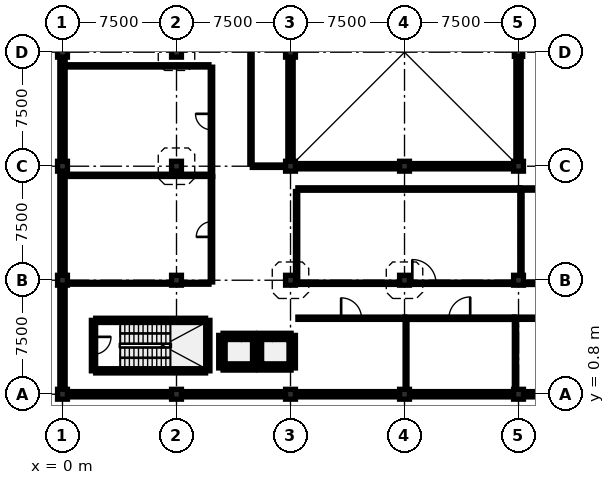
"""IFC4 building model, lengths in metres.
Left out: names, types, materials, properties, quantities, classifications, styles, units other than length and angle.
Written with IfcOpenShell. Run it as: python <this file> out.ifc"""

import sys

from ifc_helpers import new_model, si_unit, direction, frame, frame_2d, origin, origin_2d, place, context, subcontext, project, spatial, rectangle, extrude, element, fill, save


model = new_model("IFC4")
c1 = context("Model", 3, precision=1e-05, world=origin(), true_north=direction((0.0, 1.0)))
c2 = subcontext(c1, "Body", "Model", "MODEL_VIEW")
j1 = project(units=[si_unit("LENGTHUNIT", "METRE"), si_unit("PLANEANGLEUNIT", "RADIAN")], contexts=[c1])
p1 = place(None, origin())
s1 = spatial("IfcSite", under=j1, at=p1, CompositionType="ELEMENT")
p2 = place(p1, origin())
s2 = spatial("IfcBuilding", under=s1, at=p2, CompositionType="ELEMENT")
p3 = place(p2, frame((0.0, 0.0, 9.5)))
s3 = spatial("IfcBuildingStorey", under=s2, at=p3, CompositionType="ELEMENT", Elevation=9.5)
for number, where, z_axis, x_axis in (
    (1, (0.0, 0.8, 0.0), (0.0, 0.0, 1.0), (1.0, 0.0, 0.0)),
    (2, (0.0, 8.3, 0.0), (0.0, 0.0, 1.0), (1.0, 0.0, 0.0)),
    (3, (0.0, 15.8, 0.0), (0.0, 0.0, 1.0), (1.0, 0.0, 0.0)),
    (4, (0.0, 23.3, 0.0), (0.0, 0.0, 1.0), (1.0, 0.0, 0.0)),
    (5, (7.5, 0.8, 0.0), (0.0, 0.0, 1.0), (1.0, 0.0, 0.0)),
    (6, (7.5, 8.3, 0.0), (0.0, 0.0, 1.0), (1.0, 0.0, 0.0)),
    (7, (7.5, 15.8, 0.0), (0.0, 0.0, 1.0), (1.0, 0.0, 0.0)),
    (8, (7.5, 23.3, 0.0), (0.0, 0.0, 1.0), (1.0, 0.0, 0.0)),
    (9, (15.0, 0.8, 0.0), (0.0, 0.0, 1.0), (1.0, 0.0, 0.0)),
    (10, (15.0, 8.3, 0.0), (0.0, 0.0, 1.0), (1.0, 0.0, 0.0)),
    (11, (15.0, 15.8, 0.0), (0.0, 0.0, 1.0), (1.0, 0.0, 0.0)),
    (12, (15.0, 23.3, 0.0), (0.0, 0.0, 1.0), (1.0, 0.0, 0.0)),
    (13, (22.5, 0.8, 0.0), (0.0, 0.0, 1.0), (1.0, 0.0, 0.0)),
    (14, (22.5, 8.3, 0.0), (0.0, 0.0, 1.0), (1.0, 0.0, 0.0)),
    (15, (22.5, 15.8, 0.0), (0.0, 0.0, 1.0), (1.0, 0.0, 0.0)),
    (16, (30.0, 0.8, 0.0), (0.0, 0.0, 1.0), (1.0, 0.0, 0.0)),
    (17, (30.0, 8.3, 0.0), (0.0, 0.0, 1.0), (1.0, 0.0, 0.0)),
    (18, (30.0, 15.8, 0.0), (0.0, 0.0, 1.0), (1.0, 0.0, 0.0)),
):
    element("IfcColumn", number, at=place(p3, frame(where, z_axis=z_axis, x_axis=x_axis)), inside=s3, PredefinedType="COLUMN", context=c2, shape_type="SweptSolid", body=[
        extrude(rectangle(XDim=0.65, YDim=0.65, at=origin_2d()), origin(), (0.0, 0.0, 1.0), 3.7),
    ])
p4 = place(p3, frame((30.0, 23.3, 0.0), z_axis=(0.0, 0.0, 1.0), x_axis=(1.0, 0.0, 0.0)))
e19 = element("IfcColumn", 19, at=p4, inside=s3, PredefinedType="COLUMN", context=c2, shape_type="SweptSolid", body=[
    extrude(rectangle(XDim=0.55, YDim=0.55, at=origin_2d()), origin(), (0.0, 0.0, 1.0), 3.7),
])
p5 = place(p3, frame((37.2, 0.8, 0.0), z_axis=(0.0, 0.0, 1.0), x_axis=(-1.0, 0.0, 0.0)))
e20 = element("IfcWall", 20, at=p5, inside=s3, PredefinedType="SOLIDWALL", context=c2, shape_type="SweptSolid", body=[
    extrude(rectangle(XDim=6.875, YDim=0.35, at=frame_2d((3.438, 0.0))), origin(), (0.0, 0.0, 1.0), 2.985),
])
for number, where, z_axis, x_axis in (
    (21, (29.675, 0.8, 0.0), (0.0, 0.0, 1.0), (-1.0, 0.0, 0.0)),
    (22, (22.175, 0.8, 0.0), (0.0, 0.0, 1.0), (-1.0, 0.0, 0.0)),
):
    element("IfcWall", number, at=place(p3, frame(where, z_axis=z_axis, x_axis=x_axis)), inside=s3, PredefinedType="SOLIDWALL", context=c2, shape_type="SweptSolid", body=[
        extrude(rectangle(XDim=6.85, YDim=0.35, at=frame_2d((3.425, 0.0))), origin(), (0.0, 0.0, 1.0), 2.785),
    ])
for number, where, z_axis, x_axis in (
    (23, (14.675, 0.8, 0.0), (0.0, 0.0, 1.0), (-1.0, 0.0, 0.0)),
    (24, (7.175, 0.8, 0.0), (0.0, 0.0, 1.0), (-1.0, 0.0, 0.0)),
):
    element("IfcWall", number, at=place(p3, frame(where, z_axis=z_axis, x_axis=x_axis)), inside=s3, PredefinedType="SOLIDWALL", context=c2, shape_type="SweptSolid", body=[
        extrude(rectangle(XDim=6.85, YDim=0.35, at=frame_2d((3.425, 0.0))), origin(), (0.0, 0.0, 1.0), 3.035),
    ])
p6 = place(p3, frame((0.0, 1.125, 0.0), z_axis=(0.0, 0.0, 1.0), x_axis=(0.0, 1.0, 0.0)))
e25 = element("IfcWall", 25, at=p6, inside=s3, PredefinedType="SOLIDWALL", context=c2, shape_type="SweptSolid", body=[
    extrude(rectangle(XDim=6.85, YDim=0.35, at=frame_2d((3.425, 0.0))), origin(), (0.0, 0.0, 1.0), 2.985),
])
for number, where, z_axis, x_axis in (
    (26, (0.0, 8.625, 0.0), (0.0, 0.0, 1.0), (0.0, 1.0, 0.0)),
    (27, (0.0, 16.125, 0.0), (0.0, 0.0, 1.0), (0.0, 1.0, 0.0)),
    (28, (15.325, 15.8, 0.0), (0.0, 0.0, 1.0), (1.0, 0.0, 0.0)),
):
    element("IfcWall", number, at=place(p3, frame(where, z_axis=z_axis, x_axis=x_axis)), inside=s3, PredefinedType="SOLIDWALL", context=c2, shape_type="SweptSolid", body=[
        extrude(rectangle(XDim=6.85, YDim=0.35, at=frame_2d((3.425, 0.0))), origin(), (0.0, 0.0, 1.0), 2.785),
    ])
p7 = place(p3, frame((22.825, 15.8, 0.0), z_axis=(0.0, 0.0, 1.0), x_axis=(1.0, 0.0, 0.0)))
e29 = element("IfcWall", 29, at=p7, inside=s3, PredefinedType="SOLIDWALL", context=c2, shape_type="SweptSolid", body=[
    extrude(rectangle(XDim=6.85, YDim=0.35, at=frame_2d((3.425, 0.0))), origin(), (0.0, 0.0, 1.0), 2.785),
])
p8 = place(p7, frame((2.725, 0.0, 0.9)))
e30 = element("IfcOpeningElement", 30, at=p8, cuts=e29, PredefinedType="OPENING", context=c2, shape_type="SweptSolid", body=[
    extrude(rectangle(XDim=1.4, YDim=1.5, at=frame_2d((0.7, 0.75))), frame((0.0, 0.187, 0.0), z_axis=(0.0, -1.0, 0.0), x_axis=(1.0, 0.0, 0.0)), (0.0, 0.0, 1.0), 0.374),
])
p9 = place(p3, frame((30.0, 16.125, 0.0), z_axis=(0.0, 0.0, 1.0), x_axis=(0.0, 1.0, 0.0)))
e31 = element("IfcWall", 31, at=p9, inside=s3, PredefinedType="SOLIDWALL", context=c2, shape_type="SweptSolid", body=[
    extrude(rectangle(XDim=6.9, YDim=0.35, at=frame_2d((3.45, 0.0))), origin(), (0.0, 0.0, 1.0), 2.985),
])
p10 = place(p9, frame((2.75, 0.0, 0.9)))
e32 = element("IfcOpeningElement", 32, at=p10, cuts=e31, PredefinedType="OPENING", context=c2, shape_type="SweptSolid", body=[
    extrude(rectangle(XDim=1.4, YDim=1.7, at=frame_2d((0.7, 0.85))), frame((0.0, 0.187, 0.0), z_axis=(0.0, -1.0, 0.0), x_axis=(1.0, 0.0, 0.0)), (0.0, 0.0, 1.0), 0.374),
])
p11 = place(p3, frame((15.0, 22.975, 0.0), z_axis=(0.0, 0.0, 1.0), x_axis=(0.0, -1.0, 0.0)))
e33 = element("IfcWall", 33, at=p11, inside=s3, PredefinedType="SOLIDWALL", context=c2, shape_type="SweptSolid", body=[
    extrude(rectangle(XDim=6.85, YDim=0.35, at=frame_2d((3.425, 0.0))), origin(), (0.0, 0.0, 1.0), 2.785),
])
p12 = place(p3, frame((2.185, 2.34, 0.0), z_axis=(0.0, 0.0, 1.0), x_axis=(1.0, 0.0, 0.0)))
e34 = element("IfcWall", 34, at=p12, inside=s3, PredefinedType="SHEAR", context=c2, shape_type="SweptSolid", body=[
    extrude(rectangle(XDim=7.23, YDim=0.28, at=frame_2d((3.615, 0.0))), origin(), (0.0, 0.0, 1.0), 3.7),
])
p13 = place(p3, frame((9.56, 2.34, 0.0), z_axis=(0.0, 0.0, 1.0), x_axis=(0.0, 1.0, 0.0)))
e35 = element("IfcWall", 35, at=p13, inside=s3, PredefinedType="SHEAR", context=c2, shape_type="SweptSolid", body=[
    extrude(rectangle(XDim=3.32, YDim=0.28, at=frame_2d((1.66, 0.0))), origin(), (0.0, 0.0, 1.0), 3.7),
])
p14 = place(p3, frame((9.415, 5.66, 0.0), z_axis=(0.0, 0.0, 1.0), x_axis=(-1.0, 0.0, 0.0)))
e36 = element("IfcWall", 36, at=p14, inside=s3, PredefinedType="SHEAR", context=c2, shape_type="SweptSolid", body=[
    extrude(rectangle(XDim=7.23, YDim=0.28, at=frame_2d((3.615, 0.0))), origin(), (0.0, 0.0, 1.0), 3.7),
])
p15 = place(p3, frame((2.04, 5.66, 0.0), z_axis=(0.0, 0.0, 1.0), x_axis=(0.0, -1.0, 0.0)))
e37 = element("IfcWall", 37, at=p15, inside=s3, PredefinedType="SHEAR", context=c2, shape_type="SweptSolid", body=[
    extrude(rectangle(XDim=3.32, YDim=0.28, at=frame_2d((1.66, 0.0))), origin(), (0.0, 0.0, 1.0), 3.7),
])
p16 = place(p15, frame((1.085, 0.0, 0.0)))
e38 = element("IfcOpeningElement", 38, at=p16, cuts=e37, PredefinedType="OPENING", context=c2, shape_type="SweptSolid", body=[
    extrude(rectangle(XDim=1.15, YDim=2.15, at=frame_2d((0.575, 1.075))), frame((0.0, 0.152, 0.0), z_axis=(0.0, -1.0, 0.0), x_axis=(1.0, 0.0, 0.0)), (0.0, 0.0, 1.0), 0.304),
])
p17 = place(p3, frame((10.562, 2.529, 0.0), z_axis=(0.0, 0.0, 1.0), x_axis=(1.0, 0.0, 0.0)))
e39 = element("IfcWall", 39, at=p17, inside=s3, PredefinedType="SHEAR", context=c2, shape_type="SweptSolid", body=[
    extrude(rectangle(XDim=2.077, YDim=0.28, at=frame_2d((1.039, 0.0))), origin(), (0.0, 0.0, 1.0), 3.7),
])
p18 = place(p3, frame((12.783, 2.529, 0.0), z_axis=(0.0, 0.0, 1.0), x_axis=(0.0, 1.0, 0.0)))
e40 = element("IfcWall", 40, at=p18, inside=s3, PredefinedType="SHEAR", context=c2, shape_type="SweptSolid", body=[
    extrude(rectangle(XDim=2.141, YDim=0.28, at=frame_2d((1.071, 0.0))), origin(), (0.0, 0.0, 1.0), 3.7),
])
p19 = place(p3, frame((12.638, 4.671, 0.0), z_axis=(0.0, 0.0, 1.0), x_axis=(-1.0, 0.0, 0.0)))
e41 = element("IfcWall", 41, at=p19, inside=s3, PredefinedType="SHEAR", context=c2, shape_type="SweptSolid", body=[
    extrude(rectangle(XDim=2.077, YDim=0.28, at=frame_2d((1.039, 0.0))), origin(), (0.0, 0.0, 1.0), 3.7),
])
p20 = place(p19, frame((0.489, 0.0, 0.0)))
e42 = element("IfcOpeningElement", 42, at=p20, cuts=e41, PredefinedType="OPENING", context=c2, shape_type="SweptSolid", body=[
    extrude(rectangle(XDim=1.1, YDim=2.15, at=frame_2d((0.55, 1.075))), frame((0.0, 0.152, 0.0), z_axis=(0.0, -1.0, 0.0), x_axis=(1.0, 0.0, 0.0)), (0.0, 0.0, 1.0), 0.304),
])
p21 = place(p3, frame((10.417, 4.671, 0.0), z_axis=(0.0, 0.0, 1.0), x_axis=(0.0, -1.0, 0.0)))
e43 = element("IfcWall", 43, at=p21, inside=s3, PredefinedType="SHEAR", context=c2, shape_type="SweptSolid", body=[
    extrude(rectangle(XDim=2.141, YDim=0.28, at=frame_2d((1.071, 0.0))), origin(), (0.0, 0.0, 1.0), 3.7),
])
p22 = place(p3, frame((12.928, 2.529, 0.0), z_axis=(0.0, 0.0, 1.0), x_axis=(1.0, 0.0, 0.0)))
e44 = element("IfcWall", 44, at=p22, inside=s3, PredefinedType="SHEAR", context=c2, shape_type="SweptSolid", body=[
    extrude(rectangle(XDim=2.11, YDim=0.28, at=frame_2d((1.055, 0.0))), origin(), (0.0, 0.0, 1.0), 3.7),
])
p23 = place(p3, frame((15.184, 2.529, 0.0), z_axis=(0.0, 0.0, 1.0), x_axis=(0.0, 1.0, 0.0)))
e45 = element("IfcWall", 45, at=p23, inside=s3, PredefinedType="SHEAR", context=c2, shape_type="SweptSolid", body=[
    extrude(rectangle(XDim=2.141, YDim=0.28, at=frame_2d((1.071, 0.0))), origin(), (0.0, 0.0, 1.0), 3.7),
])
p24 = place(p3, frame((15.039, 4.671, 0.0), z_axis=(0.0, 0.0, 1.0), x_axis=(-1.0, 0.0, 0.0)))
e46 = element("IfcWall", 46, at=p24, inside=s3, PredefinedType="SHEAR", context=c2, shape_type="SweptSolid", body=[
    extrude(rectangle(XDim=2.11, YDim=0.28, at=frame_2d((1.055, 0.0))), origin(), (0.0, 0.0, 1.0), 3.7),
])
p25 = place(p24, frame((0.505, 0.0, 0.0)))
e47 = element("IfcOpeningElement", 47, at=p25, cuts=e46, PredefinedType="OPENING", context=c2, shape_type="SweptSolid", body=[
    extrude(rectangle(XDim=1.1, YDim=2.15, at=frame_2d((0.55, 1.075))), frame((0.0, 0.152, 0.0), z_axis=(0.0, -1.0, 0.0), x_axis=(1.0, 0.0, 0.0)), (0.0, 0.0, 1.0), 0.304),
])
p26 = place(p3, frame((15.485, 5.8, 0.0), z_axis=(0.0, 0.0, 1.0), x_axis=(1.0, 0.0, 0.0)))
e48 = element("IfcWall", 48, at=p26, inside=s3, PredefinedType="PARTITIONING", context=c2, shape_type="SweptSolid", body=[
    extrude(rectangle(XDim=7.03, YDim=0.15, at=frame_2d((3.515, 0.0))), origin(), (0.0, 0.0, 1.0), 2.785),
])
p27 = place(p26, frame((2.845, 0.0, 0.0)))
e49 = element("IfcOpeningElement", 49, at=p27, cuts=e48, PredefinedType="OPENING", context=c2, shape_type="SweptSolid", body=[
    extrude(rectangle(XDim=1.34, YDim=2.24, at=frame_2d((0.67, 1.12))), frame((0.0, 0.087, 0.0), z_axis=(0.0, -1.0, 0.0), x_axis=(1.0, 0.0, 0.0)), (0.0, 0.0, 1.0), 0.174),
])
p28 = place(p3, frame((22.527, 5.8, 0.0), z_axis=(0.0, 0.0, 1.0), x_axis=(1.0, 0.0, 0.0)))
e50 = element("IfcWall", 50, at=p28, inside=s3, PredefinedType="PARTITIONING", context=c2, shape_type="SweptSolid", body=[
    extrude(rectangle(XDim=7.188, YDim=0.16, at=frame_2d((3.594, 0.0))), origin(), (0.0, 0.0, 1.0), 2.785),
])
p29 = place(p28, frame((2.894, 0.0, 0.0)))
e51 = element("IfcOpeningElement", 51, at=p29, cuts=e50, PredefinedType="OPENING", context=c2, shape_type="SweptSolid", body=[
    extrude(rectangle(XDim=1.4, YDim=2.25, at=frame_2d((0.7, 1.125))), frame((0.0, 0.092, 0.0), z_axis=(0.0, -1.0, 0.0), x_axis=(1.0, 0.0, 0.0)), (0.0, 0.0, 1.0), 0.184),
])
p30 = place(p3, frame((29.727, 5.8, 0.0), z_axis=(0.0, 0.0, 1.0), x_axis=(1.0, 0.0, 0.0)))
e52 = element("IfcWall", 52, at=p30, inside=s3, PredefinedType="PARTITIONING", context=c2, shape_type="SweptSolid", body=[
    extrude(rectangle(XDim=9.388, YDim=0.15, at=frame_2d((4.694, 0.0))), origin(), (0.0, 0.0, 1.0), 2.985),
])
p31 = place(p30, frame((3.969, 0.0, 0.0)))
e53 = element("IfcOpeningElement", 53, at=p31, cuts=e52, PredefinedType="OPENING", context=c2, shape_type="SweptSolid", body=[
    extrude(rectangle(XDim=1.45, YDim=2.26, at=frame_2d((0.725, 1.13))), frame((0.0, 0.087, 0.0), z_axis=(0.0, -1.0, 0.0), x_axis=(1.0, 0.0, 0.0)), (0.0, 0.0, 1.0), 0.174),
])
p32 = place(p3, frame((15.337, 8.1, 0.0), z_axis=(0.0, 0.0, 1.0), x_axis=(1.0, 0.0, 0.0)))
e54 = element("IfcWall", 54, at=p32, inside=s3, PredefinedType="PARTITIONING", context=c2, shape_type="SweptSolid", body=[
    extrude(rectangle(XDim=14.571, YDim=0.15, at=frame_2d((7.286, 0.0))), origin(), (0.0, 0.0, 1.0), 2.785),
])
p33 = place(p32, frame((7.677, 0.0, 0.0)))
e55 = element("IfcOpeningElement", 55, at=p33, cuts=e54, PredefinedType="OPENING", context=c2, shape_type="SweptSolid", body=[
    extrude(rectangle(XDim=1.56, YDim=2.3, at=frame_2d((0.78, 1.15))), frame((0.0, 0.087, 0.0), z_axis=(0.0, -1.0, 0.0), x_axis=(1.0, 0.0, 0.0)), (0.0, 0.0, 1.0), 0.174),
])
p34 = place(p3, frame((30.337, 8.1, 0.0), z_axis=(0.0, 0.0, 1.0), x_axis=(1.0, 0.0, 0.0)))
e56 = element("IfcWall", 56, at=p34, inside=s3, PredefinedType="PARTITIONING", context=c2, shape_type="SweptSolid", body=[
    extrude(rectangle(XDim=14.376, YDim=0.16, at=frame_2d((7.188, 0.0))), origin(), (0.0, 0.0, 1.0), 2.985),
])
p35 = place(p34, frame((7.89, 0.0, 0.0)))
e57 = element("IfcOpeningElement", 57, at=p35, cuts=e56, PredefinedType="OPENING", context=c2, shape_type="SweptSolid", body=[
    extrude(rectangle(XDim=1.65, YDim=2.32, at=frame_2d((0.825, 1.16))), frame((0.0, 0.092, 0.0), z_axis=(0.0, -1.0, 0.0), x_axis=(1.0, 0.0, 0.0)), (0.0, 0.0, 1.0), 0.184),
])
p36 = place(p3, frame((9.8, 8.185, 0.0), z_axis=(0.0, 0.0, 1.0), x_axis=(0.0, 1.0, 0.0)))
e58 = element("IfcWall", 58, at=p36, inside=s3, PredefinedType="PARTITIONING", context=c2, shape_type="SweptSolid", body=[
    extrude(rectangle(XDim=6.93, YDim=0.16, at=frame_2d((3.465, 0.0))), origin(), (0.0, 0.0, 1.0), 2.785),
])
p37 = place(p36, frame((2.965, 0.0, 0.0)))
e59 = element("IfcOpeningElement", 59, at=p37, cuts=e58, PredefinedType="OPENING", context=c2, shape_type="SweptSolid", body=[
    extrude(rectangle(XDim=1.0, YDim=2.15, at=frame_2d((0.5, 1.075))), frame((0.0, 0.092, 0.0), z_axis=(0.0, -1.0, 0.0), x_axis=(1.0, 0.0, 0.0)), (0.0, 0.0, 1.0), 0.184),
])
p38 = place(p3, frame((9.8, 15.127, 0.0), z_axis=(0.0, 0.0, 1.0), x_axis=(0.0, 1.0, 0.0)))
e60 = element("IfcWall", 60, at=p38, inside=s3, PredefinedType="PARTITIONING", context=c2, shape_type="SweptSolid", body=[
    extrude(rectangle(XDim=7.188, YDim=0.16, at=frame_2d((3.594, 0.0))), origin(), (0.0, 0.0, 1.0), 2.785),
])
p39 = place(p38, frame((3.069, 0.0, 0.0)))
e61 = element("IfcOpeningElement", 61, at=p39, cuts=e60, PredefinedType="OPENING", context=c2, shape_type="SweptSolid", body=[
    extrude(rectangle(XDim=1.05, YDim=2.15, at=frame_2d((0.525, 1.075))), frame((0.0, 0.092, 0.0), z_axis=(0.0, -1.0, 0.0), x_axis=(1.0, 0.0, 0.0)), (0.0, 0.0, 1.0), 0.184),
])
p40 = place(p3, frame((15.485, 14.3, 0.0), z_axis=(0.0, 0.0, 1.0), x_axis=(1.0, 0.0, 0.0)))
e62 = element("IfcWall", 62, at=p40, inside=s3, PredefinedType="PARTITIONING", context=c2, shape_type="SweptSolid", body=[
    extrude(rectangle(XDim=14.59, YDim=0.16, at=frame_2d((7.295, 0.0))), origin(), (0.0, 0.0, 1.0), 2.785),
])
p41 = place(p3, frame((30.087, 14.3, 0.0), z_axis=(0.0, 0.0, 1.0), x_axis=(1.0, 0.0, 0.0)))
e63 = element("IfcWall", 63, at=p41, inside=s3, PredefinedType="PARTITIONING", context=c2, shape_type="SweptSolid", body=[
    extrude(rectangle(XDim=14.726, YDim=0.15, at=frame_2d((7.363, 0.0))), origin(), (0.0, 0.0, 1.0), 2.985),
])
p42 = place(p3, frame((12.485, 15.8, 0.0), z_axis=(0.0, 0.0, 1.0), x_axis=(1.0, 0.0, 0.0)))
e64 = element("IfcWall", 64, at=p42, inside=s3, PredefinedType="PARTITIONING", context=c2, shape_type="SweptSolid", body=[
    extrude(rectangle(XDim=2.178, YDim=0.16, at=frame_2d((1.089, 0.0))), origin(), (0.0, 0.0, 1.0), 2.785),
])
p43 = place(p3, frame((22.6, 1.137, 0.0), z_axis=(0.0, 0.0, 1.0), x_axis=(0.0, 1.0, 0.0)))
e65 = element("IfcWall", 65, at=p43, inside=s3, PredefinedType="PARTITIONING", context=c2, shape_type="SweptSolid", body=[
    extrude(rectangle(XDim=4.571, YDim=0.125, at=frame_2d((2.286, 0.0))), origin(), (0.0, 0.0, 1.0), 2.785),
])
p44 = place(p3, frame((29.8, 1.137, 0.0), z_axis=(0.0, 0.0, 1.0), x_axis=(0.0, 1.0, 0.0)))
e66 = element("IfcWall", 66, at=p44, inside=s3, PredefinedType="PARTITIONING", context=c2, shape_type="SweptSolid", body=[
    extrude(rectangle(XDim=4.576, YDim=0.15, at=frame_2d((2.288, 0.0))), origin(), (0.0, 0.0, 1.0), 2.985),
])
p45 = place(p3, frame((15.4, 8.187, 0.0), z_axis=(0.0, 0.0, 1.0), x_axis=(0.0, 1.0, 0.0)))
e67 = element("IfcWall", 67, at=p45, inside=s3, PredefinedType="PARTITIONING", context=c2, shape_type="SweptSolid", body=[
    extrude(rectangle(XDim=5.948, YDim=0.15, at=frame_2d((2.974, 0.0))), origin(), (0.0, 0.0, 1.0), 2.785),
])
p46 = place(p3, frame((30.16, 8.432, 0.0), z_axis=(0.0, 0.0, 1.0), x_axis=(0.0, 1.0, 0.0)))
e68 = element("IfcWall", 68, at=p46, inside=s3, PredefinedType="PARTITIONING", context=c2, shape_type="SweptSolid", body=[
    extrude(rectangle(XDim=5.781, YDim=0.15, at=frame_2d((2.891, 0.0))), origin(), (0.0, 0.0, 1.0), 2.985),
])
p47 = place(p3, frame((0.337, 8.1, 0.0), z_axis=(0.0, 0.0, 1.0), x_axis=(1.0, 0.0, 0.0)))
e69 = element("IfcWall", 69, at=p47, inside=s3, PredefinedType="PARTITIONING", context=c2, shape_type="SweptSolid", body=[
    extrude(rectangle(XDim=9.298, YDim=0.125, at=frame_2d((4.649, 0.0))), origin(), (0.0, 0.0, 1.0), 2.785),
])
p48 = place(p3, frame((0.187, 15.2, 0.0), z_axis=(0.0, 0.0, 1.0), x_axis=(1.0, 0.0, 0.0)))
e70 = element("IfcWall", 70, at=p48, inside=s3, PredefinedType="PARTITIONING", context=c2, shape_type="SweptSolid", body=[
    extrude(rectangle(XDim=9.521, YDim=0.15, at=frame_2d((4.76, 0.0))), origin(), (0.0, 0.0, 1.0), 2.785),
])
p49 = place(p3, frame((0.187, 22.4, 0.0), z_axis=(0.0, 0.0, 1.0), x_axis=(1.0, 0.0, 0.0)))
e71 = element("IfcWall", 71, at=p49, inside=s3, PredefinedType="PARTITIONING", context=c2, shape_type="SweptSolid", body=[
    extrude(rectangle(XDim=9.448, YDim=0.15, at=frame_2d((4.724, 0.0))), origin(), (0.0, 0.0, 1.0), 2.785),
])
p50 = place(p3, frame((12.4, 15.965, 0.0), z_axis=(0.0, 0.0, 1.0), x_axis=(0.0, 1.0, 0.0)))
e72 = element("IfcWall", 72, at=p50, inside=s3, PredefinedType="PARTITIONING", context=c2, shape_type="SweptSolid", body=[
    extrude(rectangle(XDim=17.07, YDim=0.15, at=frame_2d((8.535, 0.0))), origin(), (0.0, 0.0, 1.0), 2.785),
])
p51 = place(p8, origin())
e73 = element("IfcWindow", 73, at=p51, inside=s3, PartitioningType="SINGLE_PANEL", PredefinedType="WINDOW", context=c2, shape_type="SweptSolid", body=[
    extrude(rectangle(XDim=1.4, YDim=1.5, at=frame_2d((0.7, 0.75))), frame((0.0, 0.03, 0.0), z_axis=(0.0, -1.0, 0.0), x_axis=(1.0, 0.0, 0.0)), (0.0, 0.0, 1.0), 0.06),
])
fill(e30, e73)
p52 = place(p10, origin())
e74 = element("IfcWindow", 74, at=p52, inside=s3, PartitioningType="SINGLE_PANEL", PredefinedType="WINDOW", context=c2, shape_type="SweptSolid", body=[
    extrude(rectangle(XDim=1.4, YDim=1.7, at=frame_2d((0.7, 0.85))), frame((0.0, 0.03, 0.0), z_axis=(0.0, -1.0, 0.0), x_axis=(1.0, 0.0, 0.0)), (0.0, 0.0, 1.0), 0.06),
])
fill(e32, e74)
p53 = place(p16, origin())
e75 = element("IfcDoor", 75, at=p53, inside=s3, OperationType="SINGLE_SWING_LEFT", PredefinedType="DOOR", context=c2, shape_type="SweptSolid", body=[
    extrude(rectangle(XDim=1.15, YDim=2.15, at=frame_2d((0.575, 1.075))), frame((0.0, 0.025, 0.0), z_axis=(0.0, -1.0, 0.0), x_axis=(1.0, 0.0, 0.0)), (0.0, 0.0, 1.0), 0.05),
])
fill(e38, e75)
p54 = place(p20, origin())
e76 = element("IfcDoor", 76, at=p54, inside=s3, OperationType="SLIDING_TO_LEFT", PredefinedType="DOOR", context=c2, shape_type="SweptSolid", body=[
    extrude(rectangle(XDim=1.1, YDim=2.15, at=frame_2d((0.55, 1.075))), frame((0.0, 0.025, 0.0), z_axis=(0.0, -1.0, 0.0), x_axis=(1.0, 0.0, 0.0)), (0.0, 0.0, 1.0), 0.05),
])
fill(e42, e76)
p55 = place(p25, origin())
e77 = element("IfcDoor", 77, at=p55, inside=s3, OperationType="SLIDING_TO_RIGHT", PredefinedType="DOOR", context=c2, shape_type="SweptSolid", body=[
    extrude(rectangle(XDim=1.1, YDim=2.15, at=frame_2d((0.55, 1.075))), frame((0.0, 0.025, 0.0), z_axis=(0.0, -1.0, 0.0), x_axis=(1.0, 0.0, 0.0)), (0.0, 0.0, 1.0), 0.05),
])
fill(e47, e77)
p56 = place(p27, origin())
e78 = element("IfcDoor", 78, at=p56, inside=s3, OperationType="SINGLE_SWING_LEFT", PredefinedType="DOOR", context=c2, shape_type="SweptSolid", body=[
    extrude(rectangle(XDim=1.34, YDim=2.24, at=frame_2d((0.67, 1.12))), frame((0.0, 0.025, 0.0), z_axis=(0.0, -1.0, 0.0), x_axis=(1.0, 0.0, 0.0)), (0.0, 0.0, 1.0), 0.05),
])
fill(e49, e78)
p57 = place(p29, origin())
e79 = element("IfcDoor", 79, at=p57, inside=s3, OperationType="SINGLE_SWING_RIGHT", PredefinedType="DOOR", context=c2, shape_type="SweptSolid", body=[
    extrude(rectangle(XDim=1.4, YDim=2.25, at=frame_2d((0.7, 1.125))), frame((0.0, 0.025, 0.0), z_axis=(0.0, -1.0, 0.0), x_axis=(1.0, 0.0, 0.0)), (0.0, 0.0, 1.0), 0.05),
])
fill(e51, e79)
p58 = place(p33, origin())
e80 = element("IfcDoor", 80, at=p58, inside=s3, OperationType="SINGLE_SWING_LEFT", PredefinedType="DOOR", context=c2, shape_type="SweptSolid", body=[
    extrude(rectangle(XDim=1.56, YDim=2.3, at=frame_2d((0.78, 1.15))), frame((0.0, 0.025, 0.0), z_axis=(0.0, -1.0, 0.0), x_axis=(1.0, 0.0, 0.0)), (0.0, 0.0, 1.0), 0.05),
])
fill(e55, e80)
p59 = place(p37, origin())
e81 = element("IfcDoor", 81, at=p59, inside=s3, OperationType="SINGLE_SWING_LEFT", PredefinedType="DOOR", context=c2, shape_type="SweptSolid", body=[
    extrude(rectangle(XDim=1.0, YDim=2.15, at=frame_2d((0.5, 1.075))), frame((0.0, 0.025, 0.0), z_axis=(0.0, -1.0, 0.0), x_axis=(1.0, 0.0, 0.0)), (0.0, 0.0, 1.0), 0.05),
])
fill(e59, e81)
p60 = place(p39, origin())
e82 = element("IfcDoor", 82, at=p60, inside=s3, OperationType="SINGLE_SWING_RIGHT", PredefinedType="DOOR", context=c2, shape_type="SweptSolid", body=[
    extrude(rectangle(XDim=1.05, YDim=2.15, at=frame_2d((0.525, 1.075))), frame((0.0, 0.025, 0.0), z_axis=(0.0, -1.0, 0.0), x_axis=(1.0, 0.0, 0.0)), (0.0, 0.0, 1.0), 0.05),
])
fill(e61, e82)
save(model, sys.argv[1])
